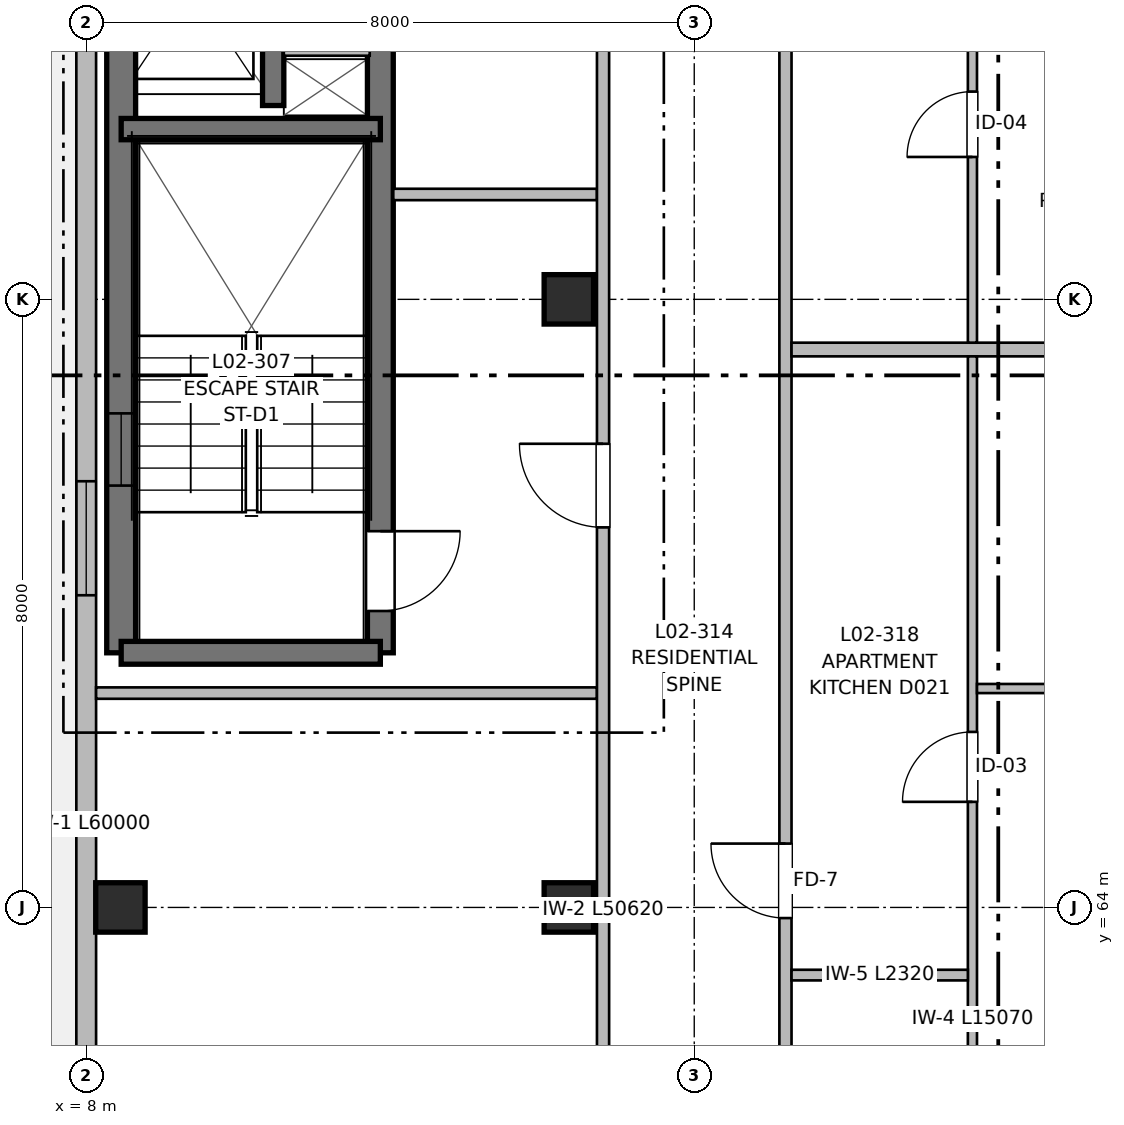
"""IFC4 building model, lengths in metres.
Left out: names, types, materials, properties, quantities, classifications, styles, units other than length and angle.
Written with IfcOpenShell. Run it as: python <this file> out.ifc"""

import sys

from ifc_helpers import new_model, si_unit, direction, frame, frame_2d, origin, origin_2d, place, context, subcontext, project, spatial, rectangle, extrude, element, fill, save


model = new_model("IFC4")
c1 = context("Model", 3, precision=1e-05, world=origin(), true_north=direction((0.0, 1.0)))
c2 = subcontext(c1, "Body", "Model", "MODEL_VIEW")
j1 = project(units=[si_unit("LENGTHUNIT", "METRE"), si_unit("PLANEANGLEUNIT", "RADIAN")], contexts=[c1])
p1 = place(None, origin())
s1 = spatial("IfcSite", under=j1, at=p1, CompositionType="ELEMENT")
p2 = place(p1, origin())
s2 = spatial("IfcBuilding", under=s1, at=p2, CompositionType="ELEMENT")
p3 = place(p2, frame((0.0, 0.0, 7.36)))
s3 = spatial("IfcBuildingStorey", under=s2, at=p3, CompositionType="ELEMENT", Elevation=7.36)
for number, where, z_axis, x_axis in (
    (1, (8.45, 64.0, 0.0), (0.0, 0.0, 1.0), (1.0, 0.0, 0.0)),
    (2, (14.35, 64.0, 0.0), (0.0, 0.0, 1.0), (1.0, 0.0, 0.0)),
    (3, (14.35, 72.0, 0.0), (0.0, 0.0, 1.0), (1.0, 0.0, 0.0)),
):
    element("IfcColumn", number, at=place(p3, frame(where, z_axis=z_axis, x_axis=x_axis)), inside=s3, PredefinedType="COLUMN", context=c2, shape_type="SweptSolid", body=[
        extrude(rectangle(XDim=0.65, YDim=0.65, at=origin_2d()), origin(), (0.0, 0.0, 1.0), 3.2),
    ])
p4 = place(p3, frame((8.46, 67.35, 0.0), z_axis=(0.0, 0.0, 1.0), x_axis=(0.0, 1.0, 0.0)))
e4 = element("IfcWall", 4, at=p4, inside=s3, PredefinedType="SHEAR", context=c2, shape_type="SweptSolid", body=[
    extrude(rectangle(XDim=12.45, YDim=0.38, at=frame_2d((6.225, 0.0))), origin(), (0.0, 0.0, 1.0), 3.2),
])
p5 = place(p4, frame((2.2, 0.0, 0.97)))
e5 = element("IfcOpeningElement", 5, at=p5, cuts=e4, PredefinedType="OPENING", context=c2, shape_type="SweptSolid", body=[
    extrude(rectangle(XDim=0.95, YDim=1.25, at=frame_2d((0.475, 0.625))), frame((0.0, 0.2, 0.0), z_axis=(0.0, -1.0, 0.0), x_axis=(1.0, 0.0, 0.0)), (0.0, 0.0, 1.0), 0.4),
])
p6 = place(p3, frame((11.87, 79.8, 0.0), z_axis=(0.0, 0.0, 1.0), x_axis=(0.0, -1.0, 0.0)))
e6 = element("IfcWall", 6, at=p6, inside=s3, PredefinedType="SHEAR", context=c2, shape_type="SweptSolid", body=[
    extrude(rectangle(XDim=12.45, YDim=0.34, at=frame_2d((6.225, 0.0))), origin(), (0.0, 0.0, 1.0), 3.2),
])
p7 = place(p6, frame((10.85, 0.0, 0.0)))
e7 = element("IfcOpeningElement", 7, at=p7, cuts=e6, PredefinedType="OPENING", context=c2, shape_type="SweptSolid", body=[
    extrude(rectangle(XDim=1.05, YDim=2.15, at=frame_2d((0.525, 1.075))), frame((0.0, 0.18, 0.0), z_axis=(0.0, -1.0, 0.0), x_axis=(1.0, 0.0, 0.0)), (0.0, 0.0, 1.0), 0.36),
])
p8 = place(p3, frame((11.87, 67.35, 0.0), z_axis=(0.0, 0.0, 1.0), x_axis=(-1.0, 0.0, 0.0)))
e8 = element("IfcWall", 8, at=p8, inside=s3, PredefinedType="SHEAR", context=c2, shape_type="SweptSolid", body=[
    extrude(rectangle(XDim=3.41, YDim=0.3, at=frame_2d((1.705, 0.0))), origin(), (0.0, 0.0, 1.0), 3.2),
])
p9 = place(p3, frame((8.46, 74.24, 0.0), z_axis=(0.0, 0.0, 1.0), x_axis=(1.0, 0.0, 0.0)))
e9 = element("IfcWall", 9, at=p9, inside=s3, PredefinedType="SHEAR", context=c2, shape_type="SweptSolid", body=[
    extrude(rectangle(XDim=3.41, YDim=0.28, at=frame_2d((1.705, 0.0))), origin(), (0.0, 0.0, 1.0), 3.2),
])
p10 = place(p3, frame((10.46, 74.55, 0.0), z_axis=(0.0, 0.0, 1.0), x_axis=(0.0, 1.0, 0.0)))
e10 = element("IfcWall", 10, at=p10, inside=s3, PredefinedType="SHEAR", context=c2, shape_type="SweptSolid", body=[
    extrude(rectangle(XDim=5.25, YDim=0.28, at=frame_2d((2.625, 0.0))), origin(), (0.0, 0.0, 1.0), 3.2),
])
p11 = place(p10, frame((1.15, 0.0, 0.0)))
e11 = element("IfcOpeningElement", 11, at=p11, cuts=e10, PredefinedType="OPENING", context=c2, shape_type="SweptSolid", body=[
    extrude(rectangle(XDim=1.0, YDim=2.15, at=frame_2d((0.5, 1.075))), frame((0.0, 0.15, 0.0), z_axis=(0.0, -1.0, 0.0), x_axis=(1.0, 0.0, 0.0)), (0.0, 0.0, 1.0), 0.3),
])
p12 = place(p10, frame((3.85, 0.0, 0.0)))
e12 = element("IfcOpeningElement", 12, at=p12, cuts=e10, PredefinedType="OPENING", context=c2, shape_type="SweptSolid", body=[
    extrude(rectangle(XDim=0.9, YDim=2.15, at=frame_2d((0.45, 1.075))), frame((0.0, 0.15, 0.0), z_axis=(0.0, -1.0, 0.0), x_axis=(1.0, 0.0, 0.0)), (0.0, 0.0, 1.0), 0.3),
])
p13 = place(p3, frame((10.6, 75.28, 0.0), z_axis=(0.0, 0.0, 1.0), x_axis=(1.0, 0.0, 0.0)))
e13 = element("IfcWall", 13, at=p13, inside=s3, PredefinedType="PARTITIONING", context=c2, shape_type="SweptSolid", body=[
    extrude(rectangle(XDim=1.13, YDim=0.15, at=frame_2d((0.565, 0.0))), origin(), (0.0, 0.0, 1.0), 2.95),
])
p14 = place(p3, frame((8.0, 56.0, 0.0), z_axis=(0.0, 0.0, 1.0), x_axis=(0.0, 1.0, 0.0)))
e14 = element("IfcWall", 14, at=p14, inside=s3, PredefinedType="SOLIDWALL", context=c2, shape_type="SweptSolid", body=[
    extrude(rectangle(XDim=60.0, YDim=0.26, at=frame_2d((30.0, 0.0))), origin(), (0.0, 0.0, 1.0), 2.98),
])
p15 = place(p14, frame((4.886, 0.0, 0.0)))
e15 = element("IfcOpeningElement", 15, at=p15, cuts=e14, PredefinedType="OPENING", context=c2, shape_type="SweptSolid", body=[
    extrude(rectangle(XDim=1.2, YDim=2.2, at=frame_2d((0.6, 1.1))), frame((0.0, 0.14, 0.0), z_axis=(0.0, -1.0, 0.0), x_axis=(1.0, 0.0, 0.0)), (0.0, 0.0, 1.0), 0.28),
])
p16 = place(p14, frame((12.107, 0.0, 0.82)))
e16 = element("IfcOpeningElement", 16, at=p16, cuts=e14, PredefinedType="OPENING", context=c2, shape_type="SweptSolid", body=[
    extrude(rectangle(XDim=1.5, YDim=1.4, at=frame_2d((0.75, 0.7))), frame((0.0, 0.14, 0.0), z_axis=(0.0, -1.0, 0.0), x_axis=(1.0, 0.0, 0.0)), (0.0, 0.0, 1.0), 0.28),
])
p17 = place(p14, frame((19.804, 0.0, 0.82)))
e17 = element("IfcOpeningElement", 17, at=p17, cuts=e14, PredefinedType="OPENING", context=c2, shape_type="SweptSolid", body=[
    extrude(rectangle(XDim=1.55, YDim=1.4, at=frame_2d((0.775, 0.7))), frame((0.0, 0.14, 0.0), z_axis=(0.0, -1.0, 0.0), x_axis=(1.0, 0.0, 0.0)), (0.0, 0.0, 1.0), 0.28),
])
p18 = place(p14, frame((29.3, 0.0, 0.87)))
e18 = element("IfcOpeningElement", 18, at=p18, cuts=e14, PredefinedType="OPENING", context=c2, shape_type="SweptSolid", body=[
    extrude(rectangle(XDim=1.4, YDim=1.35, at=frame_2d((0.7, 0.675))), frame((0.0, 0.14, 0.0), z_axis=(0.0, -1.0, 0.0), x_axis=(1.0, 0.0, 0.0)), (0.0, 0.0, 1.0), 0.28),
])
p19 = place(p14, frame((40.946, 0.0, 0.87)))
e19 = element("IfcOpeningElement", 19, at=p19, cuts=e14, PredefinedType="OPENING", context=c2, shape_type="SweptSolid", body=[
    extrude(rectangle(XDim=1.25, YDim=1.35, at=frame_2d((0.625, 0.675))), frame((0.0, 0.14, 0.0), z_axis=(0.0, -1.0, 0.0), x_axis=(1.0, 0.0, 0.0)), (0.0, 0.0, 1.0), 0.28),
])
p20 = place(p14, frame((46.493, 0.0, 0.82)))
e20 = element("IfcOpeningElement", 20, at=p20, cuts=e14, PredefinedType="OPENING", context=c2, shape_type="SweptSolid", body=[
    extrude(rectangle(XDim=1.3, YDim=1.4, at=frame_2d((0.65, 0.7))), frame((0.0, 0.14, 0.0), z_axis=(0.0, -1.0, 0.0), x_axis=(1.0, 0.0, 0.0)), (0.0, 0.0, 1.0), 0.28),
])
p21 = place(p14, frame((55.514, 0.0, 0.67)))
e21 = element("IfcOpeningElement", 21, at=p21, cuts=e14, PredefinedType="OPENING", context=c2, shape_type="SweptSolid", body=[
    extrude(rectangle(XDim=2.1, YDim=1.55, at=frame_2d((1.05, 0.775))), frame((0.0, 0.14, 0.0), z_axis=(0.0, -1.0, 0.0), x_axis=(1.0, 0.0, 0.0)), (0.0, 0.0, 1.0), 0.28),
])
p22 = place(p3, frame((8.13, 66.82, 0.0), z_axis=(0.0, 0.0, 1.0), x_axis=(1.0, 0.0, 0.0)))
e22 = element("IfcWall", 22, at=p22, inside=s3, PredefinedType="PARTITIONING", context=c2, shape_type="SweptSolid", body=[
    extrude(rectangle(XDim=6.59, YDim=0.15, at=frame_2d((3.295, 0.0))), origin(), (0.0, 0.0, 1.0), 2.935),
])
p23 = place(p3, frame((12.04, 73.38, 0.0), z_axis=(0.0, 0.0, 1.0), x_axis=(1.0, 0.0, 0.0)))
e23 = element("IfcWall", 23, at=p23, inside=s3, PredefinedType="PARTITIONING", context=c2, shape_type="SweptSolid", body=[
    extrude(rectangle(XDim=2.68, YDim=0.15, at=frame_2d((1.34, 0.0))), origin(), (0.0, 0.0, 1.0), 2.935),
])
p24 = place(p3, frame((14.8, 56.18, 0.0), z_axis=(0.0, 0.0, 1.0), x_axis=(0.0, 1.0, 0.0)))
e24 = element("IfcWall", 24, at=p24, inside=s3, PredefinedType="PARTITIONING", context=c2, shape_type="SweptSolid", body=[
    extrude(rectangle(XDim=50.62, YDim=0.16, at=frame_2d((25.31, 0.0))), origin(), (0.0, 0.0, 1.0), 2.935),
])
p25 = place(p24, frame((12.82, 0.0, 0.0)))
e25 = element("IfcOpeningElement", 25, at=p25, cuts=e24, PredefinedType="OPENING", context=c2, shape_type="SweptSolid", body=[
    extrude(rectangle(XDim=1.1, YDim=2.15, at=frame_2d((0.55, 1.075))), frame((0.0, 0.09, 0.0), z_axis=(0.0, -1.0, 0.0), x_axis=(1.0, 0.0, 0.0)), (0.0, 0.0, 1.0), 0.18),
])
p26 = place(p24, frame((19.22, 0.0, 0.0)))
e26 = element("IfcOpeningElement", 26, at=p26, cuts=e24, PredefinedType="OPENING", context=c2, shape_type="SweptSolid", body=[
    extrude(rectangle(XDim=1.6, YDim=2.15, at=frame_2d((0.8, 1.075))), frame((0.0, 0.09, 0.0), z_axis=(0.0, -1.0, 0.0), x_axis=(1.0, 0.0, 0.0)), (0.0, 0.0, 1.0), 0.18),
])
p27 = place(p24, frame((1.8, 0.0, 0.0)))
e27 = element("IfcOpeningElement", 27, at=p27, cuts=e24, PredefinedType="OPENING", context=c2, shape_type="SweptSolid", body=[
    extrude(rectangle(XDim=0.96, YDim=2.15, at=frame_2d((0.48, 1.075))), frame((0.0, 0.09, 0.0), z_axis=(0.0, -1.0, 0.0), x_axis=(1.0, 0.0, 0.0)), (0.0, 0.0, 1.0), 0.18),
])
p28 = place(p24, frame((32.625, 0.0, 0.0)))
e28 = element("IfcOpeningElement", 28, at=p28, cuts=e24, PredefinedType="OPENING", context=c2, shape_type="SweptSolid", body=[
    extrude(rectangle(XDim=0.98, YDim=2.15, at=frame_2d((0.49, 1.075))), frame((0.0, 0.09, 0.0), z_axis=(0.0, -1.0, 0.0), x_axis=(1.0, 0.0, 0.0)), (0.0, 0.0, 1.0), 0.18),
])
p29 = place(p24, frame((41.235, 0.0, 0.0)))
e29 = element("IfcOpeningElement", 29, at=p29, cuts=e24, PredefinedType="OPENING", context=c2, shape_type="SweptSolid", body=[
    extrude(rectangle(XDim=0.98, YDim=2.15, at=frame_2d((0.49, 1.075))), frame((0.0, 0.09, 0.0), z_axis=(0.0, -1.0, 0.0), x_axis=(1.0, 0.0, 0.0)), (0.0, 0.0, 1.0), 0.18),
])
p30 = place(p3, frame((17.2, 56.18, 0.0), z_axis=(0.0, 0.0, 1.0), x_axis=(0.0, 1.0, 0.0)))
e30 = element("IfcWall", 30, at=p30, inside=s3, PredefinedType="PARTITIONING", context=c2, shape_type="SweptSolid", body=[
    extrude(rectangle(XDim=50.62, YDim=0.16, at=frame_2d((25.31, 0.0))), origin(), (0.0, 0.0, 1.0), 2.935),
])
p31 = place(p30, frame((7.68, 0.0, 0.0)))
e31 = element("IfcOpeningElement", 31, at=p31, cuts=e30, PredefinedType="OPENING", context=c2, shape_type="SweptSolid", body=[
    extrude(rectangle(XDim=0.98, YDim=2.15, at=frame_2d((0.49, 1.075))), frame((0.0, 0.09, 0.0), z_axis=(0.0, -1.0, 0.0), x_axis=(1.0, 0.0, 0.0)), (0.0, 0.0, 1.0), 0.18),
])
p32 = place(p30, frame((22.43, 0.0, 0.0)))
e32 = element("IfcOpeningElement", 32, at=p32, cuts=e30, PredefinedType="OPENING", context=c2, shape_type="SweptSolid", body=[
    extrude(rectangle(XDim=0.98, YDim=2.15, at=frame_2d((0.49, 1.075))), frame((0.0, 0.09, 0.0), z_axis=(0.0, -1.0, 0.0), x_axis=(1.0, 0.0, 0.0)), (0.0, 0.0, 1.0), 0.18),
])
p33 = place(p30, frame((35.65, 0.0, 0.0)))
e33 = element("IfcOpeningElement", 33, at=p33, cuts=e30, PredefinedType="OPENING", context=c2, shape_type="SweptSolid", body=[
    extrude(rectangle(XDim=0.98, YDim=2.15, at=frame_2d((0.49, 1.075))), frame((0.0, 0.09, 0.0), z_axis=(0.0, -1.0, 0.0), x_axis=(1.0, 0.0, 0.0)), (0.0, 0.0, 1.0), 0.18),
])
p34 = place(p30, frame((46.42, 0.0, 0.0)))
e34 = element("IfcOpeningElement", 34, at=p34, cuts=e30, PredefinedType="OPENING", context=c2, shape_type="SweptSolid", body=[
    extrude(rectangle(XDim=0.98, YDim=2.15, at=frame_2d((0.49, 1.075))), frame((0.0, 0.09, 0.0), z_axis=(0.0, -1.0, 0.0), x_axis=(1.0, 0.0, 0.0)), (0.0, 0.0, 1.0), 0.18),
])
p35 = place(p3, frame((17.28, 71.34, 0.0), z_axis=(0.0, 0.0, 1.0), x_axis=(1.0, 0.0, 0.0)))
e35 = element("IfcWall", 35, at=p35, inside=s3, PredefinedType="PARTITIONING", context=c2, shape_type="SweptSolid", body=[
    extrude(rectangle(XDim=6.59, YDim=0.18, at=frame_2d((3.295, 0.0))), origin(), (0.0, 0.0, 1.0), 2.935),
])
p36 = place(p3, frame((19.66, 56.18, 0.0), z_axis=(0.0, 0.0, 1.0), x_axis=(0.0, 1.0, 0.0)))
e36 = element("IfcWall", 36, at=p36, inside=s3, PredefinedType="PARTITIONING", context=c2, shape_type="SweptSolid", body=[
    extrude(rectangle(XDim=15.07, YDim=0.12, at=frame_2d((7.535, 0.0))), origin(), (0.0, 0.0, 1.0), 2.935),
])
p37 = place(p36, frame((2.633, 0.0, 0.0)))
e37 = element("IfcOpeningElement", 37, at=p37, cuts=e36, PredefinedType="OPENING", context=c2, shape_type="SweptSolid", body=[
    extrude(rectangle(XDim=0.86, YDim=2.1, at=frame_2d((0.43, 1.05))), frame((0.0, 0.07, 0.0), z_axis=(0.0, -1.0, 0.0), x_axis=(1.0, 0.0, 0.0)), (0.0, 0.0, 1.0), 0.14),
])
p38 = place(p36, frame((9.209, 0.0, 0.0)))
e38 = element("IfcOpeningElement", 38, at=p38, cuts=e36, PredefinedType="OPENING", context=c2, shape_type="SweptSolid", body=[
    extrude(rectangle(XDim=0.92, YDim=2.1, at=frame_2d((0.46, 1.05))), frame((0.0, 0.07, 0.0), z_axis=(0.0, -1.0, 0.0), x_axis=(1.0, 0.0, 0.0)), (0.0, 0.0, 1.0), 0.14),
])
p39 = place(p3, frame((17.28, 63.11, 0.0), z_axis=(0.0, 0.0, 1.0), x_axis=(1.0, 0.0, 0.0)))
e39 = element("IfcWall", 39, at=p39, inside=s3, PredefinedType="PARTITIONING", context=c2, shape_type="SweptSolid", body=[
    extrude(rectangle(XDim=2.32, YDim=0.14, at=frame_2d((1.16, 0.0))), origin(), (0.0, 0.0, 1.0), 2.935),
])
p40 = place(p3, frame((19.72, 66.88, 0.0), z_axis=(0.0, 0.0, 1.0), x_axis=(1.0, 0.0, 0.0)))
e40 = element("IfcWall", 40, at=p40, inside=s3, PredefinedType="PARTITIONING", context=c2, shape_type="SweptSolid", body=[
    extrude(rectangle(XDim=4.15, YDim=0.12, at=frame_2d((2.075, 0.0))), origin(), (0.0, 0.0, 1.0), 2.935),
])
p41 = place(p40, frame((1.635, 0.0, 0.0)))
e41 = element("IfcOpeningElement", 41, at=p41, cuts=e40, PredefinedType="OPENING", context=c2, shape_type="SweptSolid", body=[
    extrude(rectangle(XDim=0.88, YDim=2.1, at=frame_2d((0.44, 1.05))), frame((0.0, 0.07, 0.0), z_axis=(0.0, -1.0, 0.0), x_axis=(1.0, 0.0, 0.0)), (0.0, 0.0, 1.0), 0.14),
])
p42 = place(p3, frame((19.66, 71.43, 0.0), z_axis=(0.0, 0.0, 1.0), x_axis=(0.0, 1.0, 0.0)))
e42 = element("IfcWall", 42, at=p42, inside=s3, PredefinedType="PARTITIONING", context=c2, shape_type="SweptSolid", body=[
    extrude(rectangle(XDim=13.97, YDim=0.12, at=frame_2d((6.985, 0.0))), origin(), (0.0, 0.0, 1.0), 2.935),
])
p43 = place(p42, frame((2.443, 0.0, 0.0)))
e43 = element("IfcOpeningElement", 43, at=p43, cuts=e42, PredefinedType="OPENING", context=c2, shape_type="SweptSolid", body=[
    extrude(rectangle(XDim=0.86, YDim=2.1, at=frame_2d((0.43, 1.05))), frame((0.0, 0.07, 0.0), z_axis=(0.0, -1.0, 0.0), x_axis=(1.0, 0.0, 0.0)), (0.0, 0.0, 1.0), 0.14),
])
p44 = place(p42, frame((8.541, 0.0, 0.0)))
e44 = element("IfcOpeningElement", 44, at=p44, cuts=e42, PredefinedType="OPENING", context=c2, shape_type="SweptSolid", body=[
    extrude(rectangle(XDim=0.92, YDim=2.1, at=frame_2d((0.46, 1.05))), frame((0.0, 0.07, 0.0), z_axis=(0.0, -1.0, 0.0), x_axis=(1.0, 0.0, 0.0)), (0.0, 0.0, 1.0), 0.14),
])
p45 = place(p7, origin())
e45 = element("IfcDoor", 45, at=p45, inside=s3, OperationType="SINGLE_SWING_LEFT", PredefinedType="DOOR", context=c2, shape_type="SweptSolid", body=[
    extrude(rectangle(XDim=1.05, YDim=2.15, at=frame_2d((0.525, 1.075))), frame((0.0, 0.025, 0.0), z_axis=(0.0, -1.0, 0.0), x_axis=(1.0, 0.0, 0.0)), (0.0, 0.0, 1.0), 0.05),
])
fill(e7, e45)
p46 = place(p5, origin())
e46 = element("IfcWindow", 46, at=p46, inside=s3, PartitioningType="SINGLE_PANEL", PredefinedType="WINDOW", context=c2, shape_type="SweptSolid", body=[
    extrude(rectangle(XDim=0.95, YDim=1.25, at=frame_2d((0.475, 0.625))), frame((0.0, 0.03, 0.0), z_axis=(0.0, -1.0, 0.0), x_axis=(1.0, 0.0, 0.0)), (0.0, 0.0, 1.0), 0.06),
])
fill(e5, e46)
p47 = place(p16, origin())
e47 = element("IfcWindow", 47, at=p47, inside=s3, PartitioningType="SINGLE_PANEL", PredefinedType="WINDOW", context=c2, shape_type="SweptSolid", body=[
    extrude(rectangle(XDim=1.5, YDim=1.4, at=frame_2d((0.75, 0.7))), frame((0.0, 0.03, 0.0), z_axis=(0.0, -1.0, 0.0), x_axis=(1.0, 0.0, 0.0)), (0.0, 0.0, 1.0), 0.06),
])
fill(e16, e47)
p48 = place(p25, origin())
e48 = element("IfcDoor", 48, at=p48, inside=s3, OperationType="SINGLE_SWING_RIGHT", PredefinedType="DOOR", context=c2, shape_type="SweptSolid", body=[
    extrude(rectangle(XDim=1.1, YDim=2.15, at=frame_2d((0.55, 1.075))), frame((0.0, 0.025, 0.0), z_axis=(0.0, -1.0, 0.0), x_axis=(1.0, 0.0, 0.0)), (0.0, 0.0, 1.0), 0.05),
])
fill(e25, e48)
p49 = place(p38, origin())
e49 = element("IfcDoor", 49, at=p49, inside=s3, OperationType="SINGLE_SWING_LEFT", PredefinedType="DOOR", context=c2, shape_type="SweptSolid", body=[
    extrude(rectangle(XDim=0.92, YDim=2.1, at=frame_2d((0.46, 1.05))), frame((0.0, 0.025, 0.0), z_axis=(0.0, -1.0, 0.0), x_axis=(1.0, 0.0, 0.0)), (0.0, 0.0, 1.0), 0.05),
])
fill(e38, e49)
p50 = place(p31, origin())
e50 = element("IfcDoor", 50, at=p50, inside=s3, OperationType="SINGLE_SWING_RIGHT", PredefinedType="DOOR", context=c2, shape_type="SweptSolid", body=[
    extrude(rectangle(XDim=0.98, YDim=2.15, at=frame_2d((0.49, 1.075))), frame((0.0, 0.025, 0.0), z_axis=(0.0, -1.0, 0.0), x_axis=(1.0, 0.0, 0.0)), (0.0, 0.0, 1.0), 0.05),
])
fill(e31, e50)
p51 = place(p43, origin())
e51 = element("IfcDoor", 51, at=p51, inside=s3, OperationType="SINGLE_SWING_LEFT", PredefinedType="DOOR", context=c2, shape_type="SweptSolid", body=[
    extrude(rectangle(XDim=0.86, YDim=2.1, at=frame_2d((0.43, 1.05))), frame((0.0, 0.025, 0.0), z_axis=(0.0, -1.0, 0.0), x_axis=(1.0, 0.0, 0.0)), (0.0, 0.0, 1.0), 0.05),
])
fill(e43, e51)
save(model, sys.argv[1])
